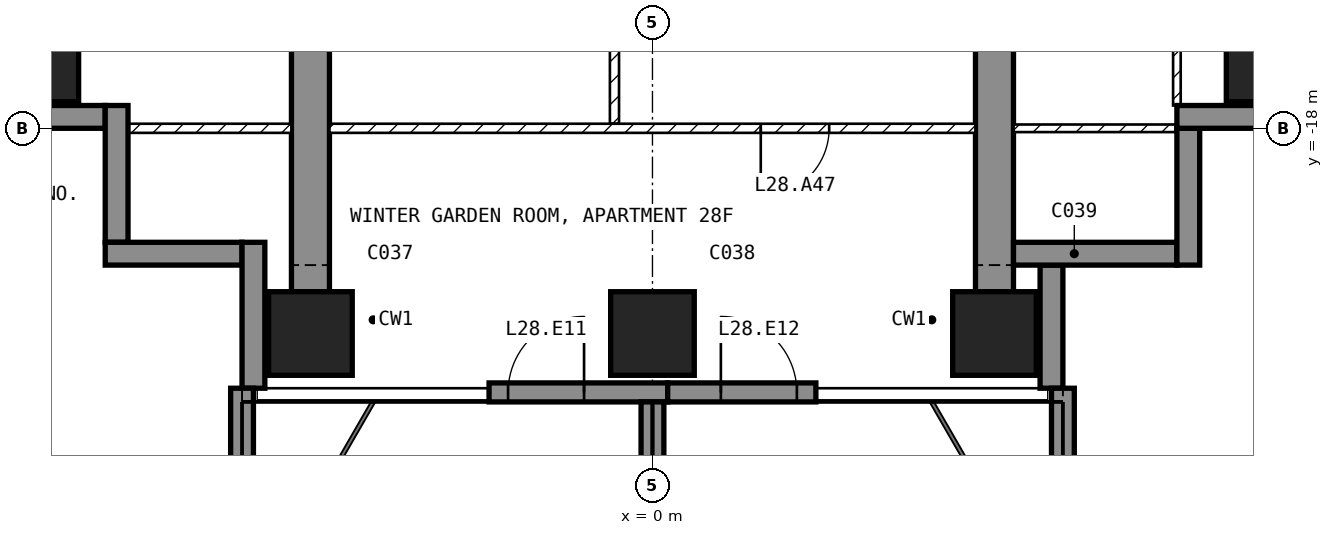
"""IFC4 building model, lengths in metres.
Left out: names, types, materials, properties, quantities, classifications, styles, units other than length and angle.
Written with IfcOpenShell. Run it as: python <this file> out.ifc"""

import sys

from ifc_helpers import new_model, si_unit, direction, frame, frame_2d, origin, origin_2d, place, context, subcontext, project, spatial, polyline, rectangle, outline, extrude, element, fill, save


model = new_model("IFC4")
c1 = context("Model", 3, precision=1e-05, world=origin(), true_north=direction((0.0, 1.0)))
c2 = subcontext(c1, "Body", "Model", "MODEL_VIEW")
j1 = project(units=[si_unit("LENGTHUNIT", "METRE"), si_unit("PLANEANGLEUNIT", "RADIAN")], contexts=[c1])
p1 = place(None, origin())
s1 = spatial("IfcSite", under=j1, at=p1, CompositionType="ELEMENT")
p2 = place(p1, origin())
s2 = spatial("IfcBuilding", under=s1, at=p2, CompositionType="ELEMENT")
p3 = place(p2, frame((0.0, 0.0, 119.9)))
s3 = spatial("IfcBuildingStorey", under=s2, at=p3, CompositionType="ELEMENT", Elevation=119.9)
for number, where, z_axis, x_axis in (
    (1, (-8.1, -17.1, -0.25), (0.0, 0.0, 1.0), (1.0, 0.0, 0.0)),
    (2, (-4.5, -20.7, -0.25), (0.0, 0.0, 1.0), (1.0, 0.0, 0.0)),
    (3, (0.0, -20.7, -0.25), (0.0, 0.0, 1.0), (1.0, 0.0, 0.0)),
    (4, (4.5, -20.7, -0.25), (0.0, 0.0, 1.0), (1.0, 0.0, 0.0)),
    (5, (8.1, -17.1, -0.25), (0.0, 0.0, 1.0), (1.0, 0.0, 0.0)),
):
    element("IfcColumn", number, at=place(p3, frame(where, z_axis=z_axis, x_axis=x_axis)), inside=s3, PredefinedType="COLUMN", context=c2, shape_type="SweptSolid", body=[
        extrude(rectangle(XDim=1.1, YDim=1.1, at=origin_2d()), origin(), (0.0, 0.0, 1.0), 3.5),
    ])
for number, where, z_axis, x_axis in (
    (6, (-4.75, -20.15, -0.25), (1.0, 0.0, 0.0), (0.0, 1.0, 0.0)),
    (7, (4.25, -20.15, -0.25), (1.0, 0.0, 0.0), (0.0, 1.0, 0.0)),
):
    element("IfcWall", number, at=place(p3, frame(where, z_axis=z_axis, x_axis=x_axis)), inside=s3, PredefinedType="SHEAR", context=c2, shape_type="SweptSolid", body=[
        extrude(outline(polyline([(0.0, 0.0), (6.65, 0.0), (6.65, 2.65), (9.05, 2.65), (9.05, 0.0), (11.15, 0.0), (11.15, 3.5), (0.0, 3.5), (0.0, 0.0)])), origin(), (0.0, 0.0, 1.0), 0.5),
    ])
p4 = place(p3, frame((-2.15, -21.475, 0.0), z_axis=(0.0, 0.0, 1.0), x_axis=(1.0, 0.0, 0.0)))
e8 = element("IfcWall", 8, at=p4, inside=s3, PredefinedType="SOLIDWALL", context=c2, shape_type="SweptSolid", body=[
    extrude(rectangle(XDim=2.35, YDim=0.25, at=frame_2d((1.175, 0.0))), origin(), (0.0, 0.0, 1.0), 3.25),
])
p5 = place(p4, frame((0.25, 0.0, 0.0)))
e9 = element("IfcOpeningElement", 9, at=p5, cuts=e8, PredefinedType="OPENING", context=c2, shape_type="SweptSolid", body=[
    extrude(rectangle(XDim=1.0, YDim=2.4, at=frame_2d((0.5, 1.2))), frame((0.0, 0.135, 0.0), z_axis=(0.0, -1.0, 0.0), x_axis=(1.0, 0.0, 0.0)), (0.0, 0.0, 1.0), 0.27),
])
p6 = place(p3, frame((0.2, -21.475, 0.0), z_axis=(0.0, 0.0, 1.0), x_axis=(1.0, 0.0, 0.0)))
e10 = element("IfcWall", 10, at=p6, inside=s3, PredefinedType="SOLIDWALL", context=c2, shape_type="SweptSolid", body=[
    extrude(rectangle(XDim=1.95, YDim=0.25, at=frame_2d((0.975, 0.0))), origin(), (0.0, 0.0, 1.0), 3.25),
])
p7 = place(p6, frame((0.7, 0.0, 0.0)))
e11 = element("IfcOpeningElement", 11, at=p7, cuts=e10, PredefinedType="OPENING", context=c2, shape_type="SweptSolid", body=[
    extrude(rectangle(XDim=1.0, YDim=2.4, at=frame_2d((0.5, 1.2))), frame((0.0, 0.135, 0.0), z_axis=(0.0, -1.0, 0.0), x_axis=(1.0, 0.0, 0.0)), (0.0, 0.0, 1.0), 0.27),
])
p8 = place(p3, frame((5.25, -21.42, 0.0), z_axis=(0.0, 0.0, 1.0), x_axis=(0.0, 1.0, 0.0)))
e12 = element("IfcWall", 12, at=p8, inside=s3, PredefinedType="SOLIDWALL", context=c2, shape_type="SweptSolid", body=[
    extrude(rectangle(XDim=1.62, YDim=0.3, at=frame_2d((0.81, 0.0))), origin(), (0.0, 0.0, 1.0), 3.25),
])
p9 = place(p3, frame((4.75, -19.65, 0.0), z_axis=(0.0, 0.0, 1.0), x_axis=(1.0, 0.0, 0.0)))
e13 = element("IfcWall", 13, at=p9, inside=s3, PredefinedType="SOLIDWALL", context=c2, shape_type="SweptSolid", body=[
    extrude(rectangle(XDim=2.15, YDim=0.3, at=frame_2d((1.075, 0.0))), origin(), (0.0, 0.0, 1.0), 3.25),
])
p10 = place(p3, frame((7.05, -19.8, 0.0), z_axis=(0.0, 0.0, 1.0), x_axis=(0.0, 1.0, 0.0)))
e14 = element("IfcWall", 14, at=p10, inside=s3, PredefinedType="SOLIDWALL", context=c2, shape_type="SweptSolid", body=[
    extrude(rectangle(XDim=1.8, YDim=0.3, at=frame_2d((0.9, 0.0))), origin(), (0.0, 0.0, 1.0), 3.25),
])
p11 = place(p3, frame((6.9, -17.85, 0.0), z_axis=(0.0, 0.0, 1.0), x_axis=(1.0, 0.0, 0.0)))
e15 = element("IfcWall", 15, at=p11, inside=s3, PredefinedType="SOLIDWALL", context=c2, shape_type="SweptSolid", body=[
    extrude(rectangle(XDim=1.85, YDim=0.3, at=frame_2d((0.925, 0.0))), origin(), (0.0, 0.0, 1.0), 3.25),
])
p12 = place(p3, frame((-8.75, -17.85, 0.0), z_axis=(0.0, 0.0, 1.0), x_axis=(1.0, 0.0, 0.0)))
e16 = element("IfcWall", 16, at=p12, inside=s3, PredefinedType="SOLIDWALL", context=c2, shape_type="SweptSolid", body=[
    extrude(rectangle(XDim=1.55, YDim=0.3, at=frame_2d((0.775, 0.0))), origin(), (0.0, 0.0, 1.0), 3.25),
])
for number, where, z_axis, x_axis in (
    (17, (-7.05, -17.7, 0.0), (0.0, 0.0, 1.0), (0.0, -1.0, 0.0)),
    (18, (-7.2, -19.65, 0.0), (0.0, 0.0, 1.0), (1.0, 0.0, 0.0)),
):
    element("IfcWall", number, at=place(p3, frame(where, z_axis=z_axis, x_axis=x_axis)), inside=s3, PredefinedType="SOLIDWALL", context=c2, shape_type="SweptSolid", body=[
        extrude(rectangle(XDim=1.8, YDim=0.3, at=frame_2d((0.9, 0.0))), origin(), (0.0, 0.0, 1.0), 3.25),
    ])
p13 = place(p3, frame((-5.25, -19.5, 0.0), z_axis=(0.0, 0.0, 1.0), x_axis=(0.0, -1.0, 0.0)))
e19 = element("IfcWall", 19, at=p13, inside=s3, PredefinedType="SOLIDWALL", context=c2, shape_type="SweptSolid", body=[
    extrude(rectangle(XDim=1.92, YDim=0.3, at=frame_2d((0.96, 0.0))), origin(), (0.0, 0.0, 1.0), 3.25),
])
p14 = place(p3, frame((-5.4, -21.42, 0.0), z_axis=(0.0, 0.0, 1.0), x_axis=(0.0, -1.0, 0.0)))
e20 = element("IfcWall", 20, at=p14, inside=s3, PredefinedType="SOLIDWALL", context=c2, shape_type="SweptSolid", body=[
    extrude(rectangle(XDim=2.88, YDim=0.3, at=frame_2d((1.44, 0.0))), origin(), (0.0, 0.0, 1.0), 3.25),
])
p15 = place(p3, frame((0.0, -21.6, 0.0), z_axis=(0.0, 0.0, 1.0), x_axis=(0.0, -1.0, 0.0)))
e21 = element("IfcWall", 21, at=p15, inside=s3, PredefinedType="SOLIDWALL", context=c2, shape_type="SweptSolid", body=[
    extrude(rectangle(XDim=2.7, YDim=0.3, at=frame_2d((1.35, 0.0))), origin(), (0.0, 0.0, 1.0), 3.25),
])
p16 = place(p3, frame((5.4, -21.42, 0.0), z_axis=(0.0, 0.0, 1.0), x_axis=(0.0, -1.0, 0.0)))
e22 = element("IfcWall", 22, at=p16, inside=s3, PredefinedType="SOLIDWALL", context=c2, shape_type="SweptSolid", body=[
    extrude(rectangle(XDim=2.88, YDim=0.3, at=frame_2d((1.44, 0.0))), origin(), (0.0, 0.0, 1.0), 3.25),
])
p17 = place(p3, frame((-0.5, -17.94, 0.0), z_axis=(0.0, 0.0, 1.0), x_axis=(0.0, 1.0, 0.0)))
e23 = element("IfcWall", 23, at=p17, inside=s3, PredefinedType="PARTITIONING", context=c2, shape_type="SweptSolid", body=[
    extrude(rectangle(XDim=2.88, YDim=0.12, at=frame_2d((1.44, 0.0))), origin(), (0.0, 0.0, 1.0), 3.25),
])
p18 = place(p17, frame((0.99, 0.0, 0.0)))
e24 = element("IfcOpeningElement", 24, at=p18, cuts=e23, PredefinedType="OPENING", context=c2, shape_type="SweptSolid", body=[
    extrude(rectangle(XDim=0.9, YDim=2.1, at=frame_2d((0.45, 1.05))), frame((0.0, 0.07, 0.0), z_axis=(0.0, -1.0, 0.0), x_axis=(1.0, 0.0, 0.0)), (0.0, 0.0, 1.0), 0.14),
])
p19 = place(p3, frame((4.25, -18.0, 0.0), z_axis=(0.0, 0.0, 1.0), x_axis=(-1.0, 0.0, 0.0)))
e25 = element("IfcWall", 25, at=p19, inside=s3, PredefinedType="PARTITIONING", context=c2, shape_type="SweptSolid", body=[
    extrude(rectangle(XDim=8.5, YDim=0.12, at=frame_2d((4.25, 0.0))), origin(), (0.0, 0.0, 1.0), 3.25),
])
p20 = place(p19, frame((1.925, 0.0, 0.0)))
e26 = element("IfcOpeningElement", 26, at=p20, cuts=e25, PredefinedType="OPENING", context=c2, shape_type="SweptSolid", body=[
    extrude(rectangle(XDim=0.9, YDim=2.1, at=frame_2d((0.45, 1.05))), frame((0.0, 0.07, 0.0), z_axis=(0.0, -1.0, 0.0), x_axis=(1.0, 0.0, 0.0)), (0.0, 0.0, 1.0), 0.14),
])
p21 = place(p3, frame((6.9, -17.7, 0.0), z_axis=(0.0, 0.0, 1.0), x_axis=(0.0, 1.0, 0.0)))
e27 = element("IfcWall", 27, at=p21, inside=s3, PredefinedType="PARTITIONING", context=c2, shape_type="SweptSolid", body=[
    extrude(rectangle(XDim=3.25, YDim=0.1, at=frame_2d((1.625, 0.0))), origin(), (0.0, 0.0, 1.0), 3.25),
])
p22 = place(p21, frame((2.2, 0.0, 0.0)))
e28 = element("IfcOpeningElement", 28, at=p22, cuts=e27, PredefinedType="OPENING", context=c2, shape_type="SweptSolid", body=[
    extrude(rectangle(XDim=0.85, YDim=2.1, at=frame_2d((0.425, 1.05))), frame((0.0, 0.06, 0.0), z_axis=(0.0, -1.0, 0.0), x_axis=(1.0, 0.0, 0.0)), (0.0, 0.0, 1.0), 0.12),
])
p23 = place(p3, frame((7.12, -18.0, 0.0), z_axis=(0.0, 0.0, 1.0), x_axis=(-1.0, 0.0, 0.0)))
e29 = element("IfcWall", 29, at=p23, inside=s3, PredefinedType="PARTITIONING", context=c2, shape_type="SweptSolid", body=[
    extrude(rectangle(XDim=2.37, YDim=0.1, at=frame_2d((1.185, 0.0))), origin(), (0.0, 0.0, 1.0), 3.25),
])
p24 = place(p3, frame((-4.75, -18.0, 0.0), z_axis=(0.0, 0.0, 1.0), x_axis=(-1.0, 0.0, 0.0)))
e30 = element("IfcWall", 30, at=p24, inside=s3, PredefinedType="PARTITIONING", context=c2, shape_type="SweptSolid", body=[
    extrude(rectangle(XDim=2.37, YDim=0.12, at=frame_2d((1.185, 0.0))), origin(), (0.0, 0.0, 1.0), 3.25),
])
p25 = place(p5, origin())
e31 = element("IfcDoor", 31, at=p25, inside=s3, OperationType="SINGLE_SWING_RIGHT", PredefinedType="DOOR", context=c2, shape_type="SweptSolid", body=[
    extrude(rectangle(XDim=1.0, YDim=2.4, at=frame_2d((0.5, 1.2))), frame((0.0, 0.025, 0.0), z_axis=(0.0, -1.0, 0.0), x_axis=(1.0, 0.0, 0.0)), (0.0, 0.0, 1.0), 0.05),
])
fill(e9, e31)
p26 = place(p7, origin())
e32 = element("IfcDoor", 32, at=p26, inside=s3, OperationType="SINGLE_SWING_LEFT", PredefinedType="DOOR", context=c2, shape_type="SweptSolid", body=[
    extrude(rectangle(XDim=1.0, YDim=2.4, at=frame_2d((0.5, 1.2))), frame((0.0, 0.025, 0.0), z_axis=(0.0, -1.0, 0.0), x_axis=(1.0, 0.0, 0.0)), (0.0, 0.0, 1.0), 0.05),
])
fill(e11, e32)
p27 = place(p20, origin())
e33 = element("IfcDoor", 33, at=p27, inside=s3, OperationType="SINGLE_SWING_RIGHT", PredefinedType="DOOR", context=c2, shape_type="SweptSolid", body=[
    extrude(rectangle(XDim=0.9, YDim=2.1, at=frame_2d((0.45, 1.05))), frame((0.0, 0.025, 0.0), z_axis=(0.0, -1.0, 0.0), x_axis=(1.0, 0.0, 0.0)), (0.0, 0.0, 1.0), 0.05),
])
fill(e26, e33)
save(model, sys.argv[1])
